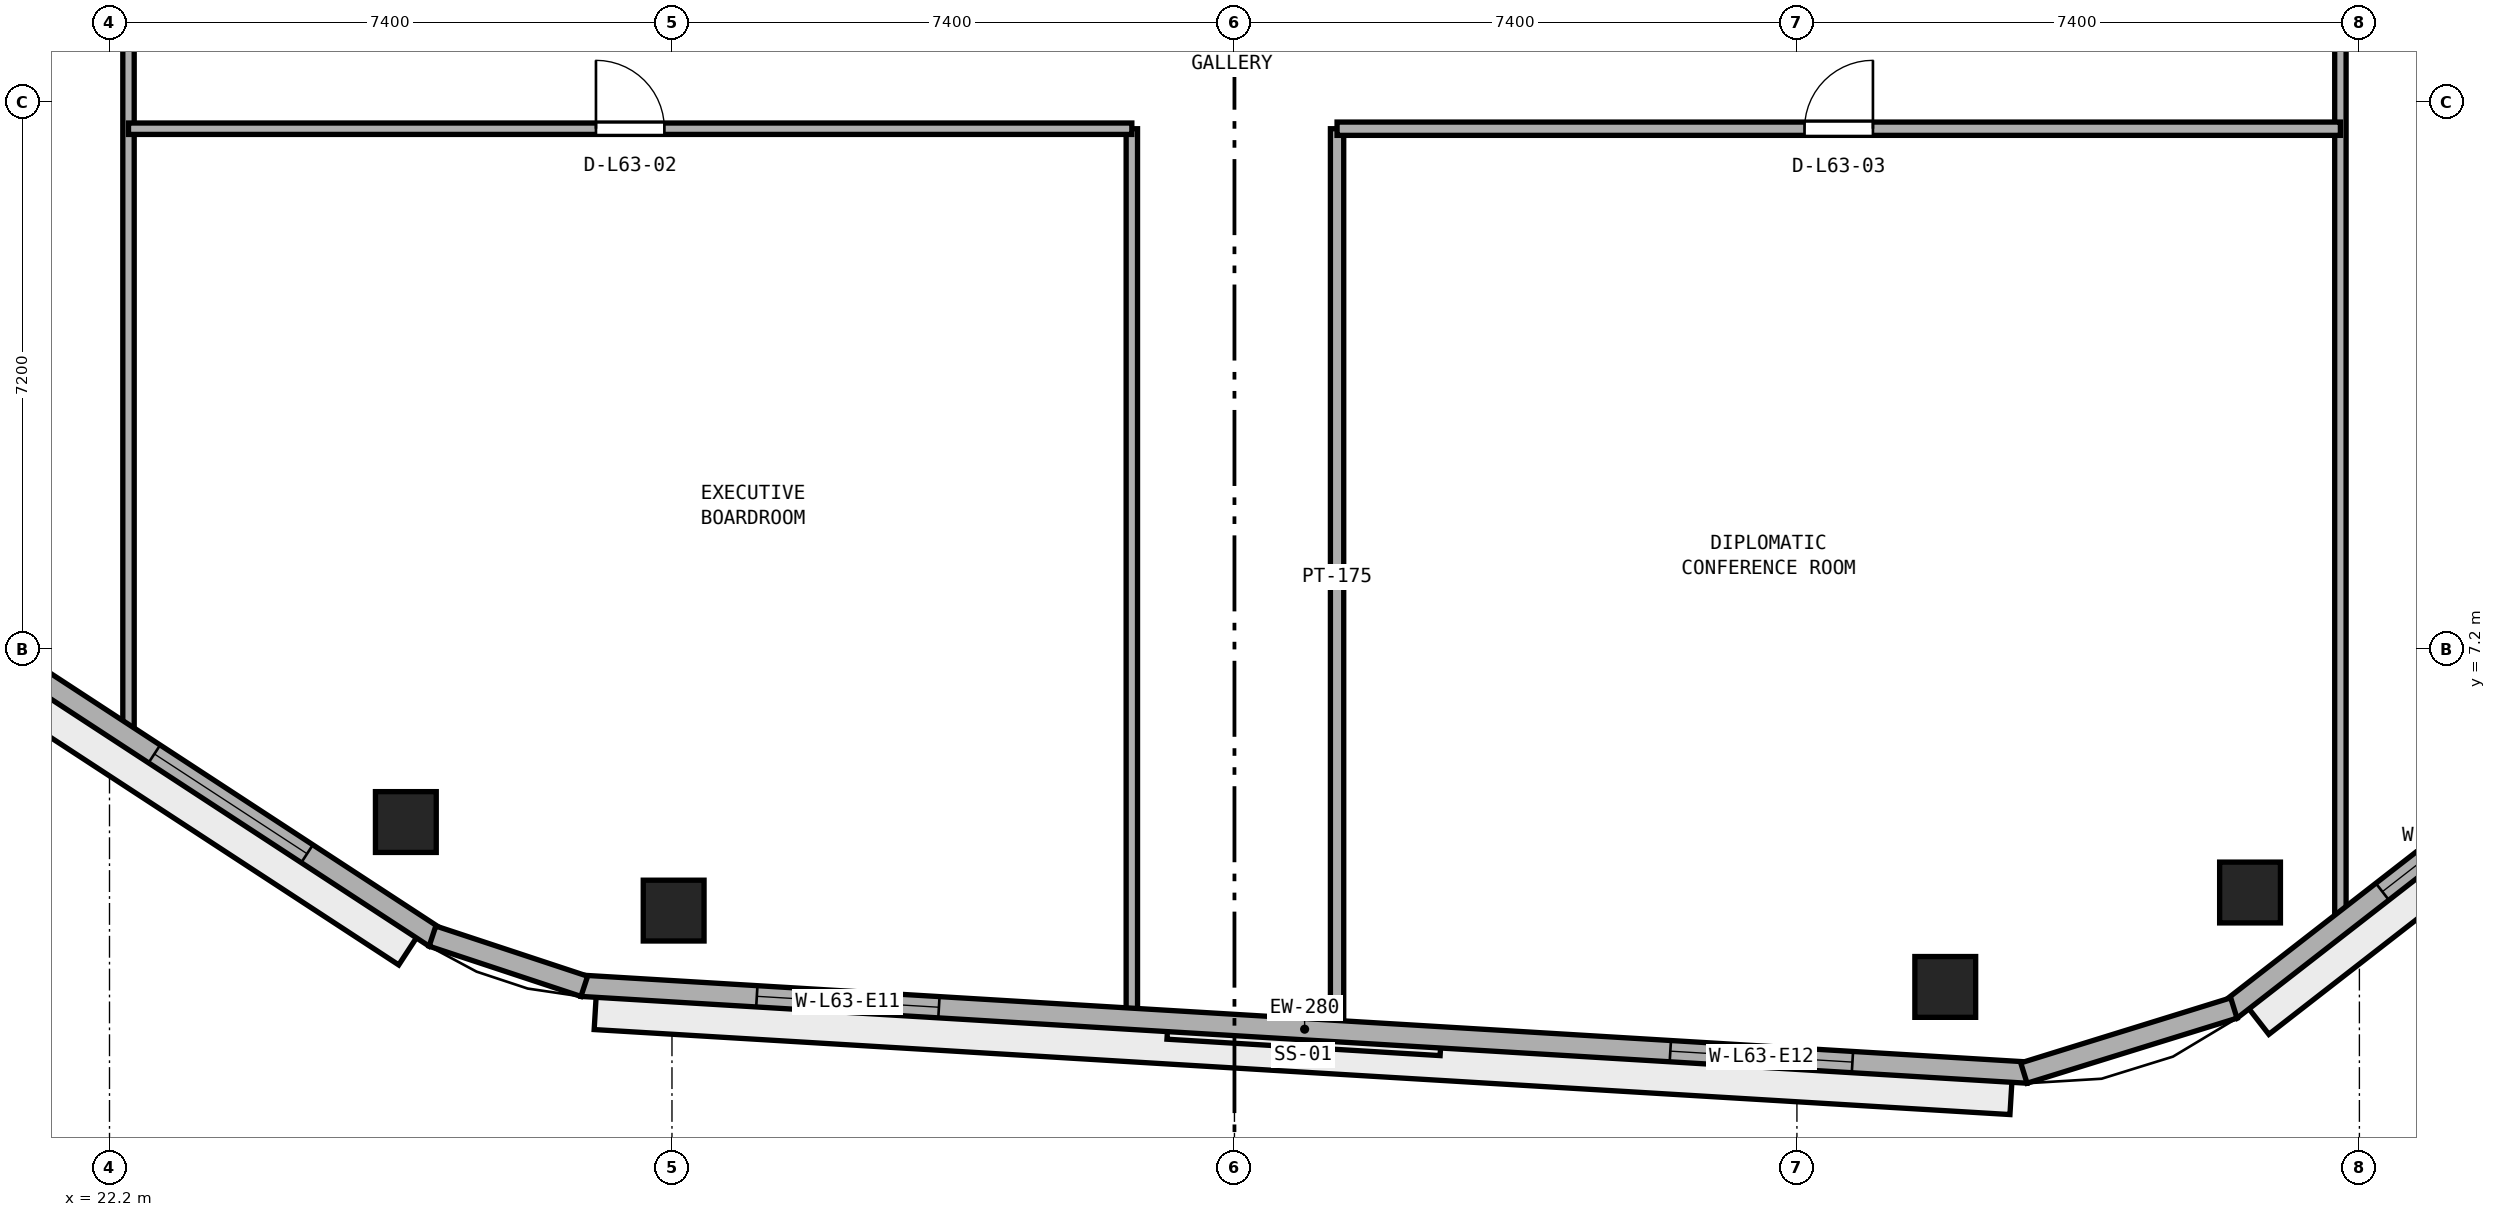
"""IFC4 building model, lengths in metres.
Left out: names, types, materials, properties, quantities, classifications, styles, units other than length and angle.
Written with IfcOpenShell. Run it as: python <this file> out.ifc"""

import sys

from ifc_helpers import new_model, si_unit, direction, frame, frame_2d, origin, origin_2d, place, context, subcontext, project, spatial, rectangle, extrude, element, fill, save


model = new_model("IFC4")
c1 = context("Model", 3, precision=1e-05, world=origin(), true_north=direction((0.0, 1.0)))
c2 = subcontext(c1, "Body", "Model", "MODEL_VIEW")
j1 = project(units=[si_unit("LENGTHUNIT", "METRE"), si_unit("PLANEANGLEUNIT", "RADIAN")], contexts=[c1])
p1 = place(None, origin())
s1 = spatial("IfcSite", under=j1, at=p1, CompositionType="ELEMENT")
p2 = place(p1, origin())
s2 = spatial("IfcBuilding", under=s1, at=p2, CompositionType="ELEMENT")
p3 = place(p2, frame((0.0, 0.0, 247.8)))
s3 = spatial("IfcBuildingStorey", under=s2, at=p3, CompositionType="ELEMENT", Elevation=247.8)
for number, where, z_axis, x_axis in (
    (1, (29.622, 3.764, 0.0), (0.0, 0.0, 1.0), (1.0, 0.0, 0.0)),
    (2, (46.352, 2.76, 0.0), (0.0, 0.0, 1.0), (1.0, 0.0, 0.0)),
    (3, (50.361, 4.002, 0.0), (0.0, 0.0, 1.0), (1.0, 0.0, 0.0)),
    (4, (26.099, 4.929, 0.0), (0.0, 0.0, 1.0), (1.0, 0.0, 0.0)),
):
    element("IfcColumn", number, at=place(p3, frame(where, z_axis=z_axis, x_axis=x_axis)), inside=s3, PredefinedType="COLUMN", context=c2, shape_type="SweptSolid", body=[
        extrude(rectangle(XDim=0.8, YDim=0.8, at=origin_2d()), origin(), (0.0, 0.0, 1.0), 3.8),
    ])
p4 = place(p3, frame((51.55, 3.546, 0.0), z_axis=(0.0, 0.0, 1.0), x_axis=(0.0, 1.0, 0.0)))
e5 = element("IfcWall", 5, at=p4, inside=s3, PredefinedType="PARTITIONING", context=c2, shape_type="SweptSolid", body=[
    extrude(rectangle(XDim=24.254, YDim=0.15, at=frame_2d((12.127, 0.0))), origin(), (0.0, 0.0, 1.0), 3.51),
])
p5 = place(p4, frame((16.759, 0.0, 0.0)))
e6 = element("IfcOpeningElement", 6, at=p5, cuts=e5, PredefinedType="OPENING", context=c2, shape_type="SweptSolid", body=[
    extrude(rectangle(XDim=1.0, YDim=2.12, at=frame_2d((0.5, 1.06))), frame((0.0, 0.085, 0.0), z_axis=(0.0, -1.0, 0.0), x_axis=(1.0, 0.0, 0.0)), (0.0, 0.0, 1.0), 0.17),
])
p6 = place(p3, frame((38.35, 2.243, 0.0), z_axis=(0.0, 0.0, 1.0), x_axis=(0.0, 1.0, 0.0)))
e7 = element("IfcWall", 7, at=p6, inside=s3, PredefinedType="PARTITIONING", context=c2, shape_type="SweptSolid", body=[
    extrude(rectangle(XDim=11.807, YDim=0.175, at=frame_2d((5.904, 0.0))), origin(), (0.0, 0.0, 1.0), 3.51),
])
p7 = place(p3, frame((35.65, 2.405, 0.0), z_axis=(0.0, 0.0, 1.0), x_axis=(0.0, 1.0, 0.0)))
e8 = element("IfcWall", 8, at=p7, inside=s3, PredefinedType="PARTITIONING", context=c2, shape_type="SweptSolid", body=[
    extrude(rectangle(XDim=11.645, YDim=0.15, at=frame_2d((5.823, 0.0))), origin(), (0.0, 0.0, 1.0), 3.51),
])
p8 = place(p3, frame((22.45, 6.02, 0.0), z_axis=(0.0, 0.0, 1.0), x_axis=(0.0, 1.0, 0.0)))
e9 = element("IfcWall", 9, at=p8, inside=s3, PredefinedType="PARTITIONING", context=c2, shape_type="SweptSolid", body=[
    extrude(rectangle(XDim=38.106, YDim=0.15, at=frame_2d((19.053, 0.0))), origin(), (0.0, 0.0, 1.0), 3.51),
])
p9 = place(p8, frame((11.005, 0.0, 0.0)))
e10 = element("IfcOpeningElement", 10, at=p9, cuts=e9, PredefinedType="OPENING", context=c2, shape_type="SweptSolid", body=[
    extrude(rectangle(XDim=0.9, YDim=2.1, at=frame_2d((0.45, 1.05))), frame((0.0, 0.085, 0.0), z_axis=(0.0, -1.0, 0.0), x_axis=(1.0, 0.0, 0.0)), (0.0, 0.0, 1.0), 0.17),
])
p10 = place(p8, frame((22.155, 0.0, 0.0)))
e11 = element("IfcOpeningElement", 11, at=p10, cuts=e9, PredefinedType="OPENING", context=c2, shape_type="SweptSolid", body=[
    extrude(rectangle(XDim=0.9, YDim=2.1, at=frame_2d((0.45, 1.05))), frame((0.0, 0.085, 0.0), z_axis=(0.0, -1.0, 0.0), x_axis=(1.0, 0.0, 0.0)), (0.0, 0.0, 1.0), 0.17),
])
p11 = place(p3, frame((22.45, 14.05, 0.0), z_axis=(0.0, 0.0, 1.0), x_axis=(1.0, 0.0, 0.0)))
e12 = element("IfcWall", 12, at=p11, inside=s3, PredefinedType="PARTITIONING", context=c2, shape_type="SweptSolid", body=[
    extrude(rectangle(XDim=13.2, YDim=0.15, at=frame_2d((6.6, 0.0))), origin(), (0.0, 0.0, 1.0), 3.51),
])
p12 = place(p11, frame((6.15, 0.0, 0.0)))
e13 = element("IfcOpeningElement", 13, at=p12, cuts=e12, PredefinedType="OPENING", context=c2, shape_type="SweptSolid", body=[
    extrude(rectangle(XDim=0.9, YDim=2.1, at=frame_2d((0.45, 1.05))), frame((0.0, 0.085, 0.0), z_axis=(0.0, -1.0, 0.0), x_axis=(1.0, 0.0, 0.0)), (0.0, 0.0, 1.0), 0.17),
])
p13 = place(p3, frame((38.35, 14.05, 0.0), z_axis=(0.0, 0.0, 1.0), x_axis=(1.0, 0.0, 0.0)))
e14 = element("IfcWall", 14, at=p13, inside=s3, PredefinedType="PARTITIONING", context=c2, shape_type="SweptSolid", body=[
    extrude(rectangle(XDim=13.2, YDim=0.175, at=frame_2d((6.6, 0.0))), origin(), (0.0, 0.0, 1.0), 3.51),
])
p14 = place(p13, frame((6.15, 0.0, 0.0)))
e15 = element("IfcOpeningElement", 15, at=p14, cuts=e14, PredefinedType="OPENING", context=c2, shape_type="SweptSolid", body=[
    extrude(rectangle(XDim=0.9, YDim=2.1, at=frame_2d((0.45, 1.05))), frame((0.0, 0.097, 0.0), z_axis=(0.0, -1.0, 0.0), x_axis=(1.0, 0.0, 0.0)), (0.0, 0.0, 1.0), 0.195),
])
p15 = place(p3, frame((28.411, 2.774, 0.0), z_axis=(0.0, 0.0, 1.0), x_axis=(0.998203068368, -0.059921901676, 0.0)))
e16 = element("IfcWall", 16, at=p15, inside=s3, PredefinedType="STANDARD", context=c2, shape_type="SweptSolid", body=[
    extrude(rectangle(XDim=19.06, YDim=0.28, at=frame_2d((9.53, 0.0))), origin(), (0.0, 0.0, 1.0), 3.51),
])
p16 = place(p15, frame((2.31, 0.0, 0.9)))
e17 = element("IfcOpeningElement", 17, at=p16, cuts=e16, PredefinedType="OPENING", context=c2, shape_type="SweptSolid", body=[
    extrude(rectangle(XDim=2.4, YDim=1.75, at=frame_2d((1.2, 0.875))), frame((0.0, 0.15, 0.0), z_axis=(0.0, -1.0, 0.0), x_axis=(1.0, 0.0, 0.0)), (0.0, 0.0, 1.0), 0.3),
])
p17 = place(p15, frame((14.35, 0.0, 0.9)))
e18 = element("IfcOpeningElement", 18, at=p17, cuts=e16, PredefinedType="OPENING", context=c2, shape_type="SweptSolid", body=[
    extrude(rectangle(XDim=2.4, YDim=1.75, at=frame_2d((1.2, 0.875))), frame((0.0, 0.15, 0.0), z_axis=(0.0, -1.0, 0.0), x_axis=(1.0, 0.0, 0.0)), (0.0, 0.0, 1.0), 0.3),
])
p18 = place(p3, frame((50.104, 2.459, 0.0), z_axis=(0.0, 0.0, 1.0), x_axis=(0.789464857485, 0.613795763097, 0.0)))
e19 = element("IfcWall", 19, at=p18, inside=s3, PredefinedType="STANDARD", context=c2, shape_type="SweptSolid", body=[
    extrude(rectangle(XDim=17.387, YDim=0.28, at=frame_2d((8.694, 0.0))), origin(), (0.0, 0.0, 1.0), 3.51),
])
p19 = place(p18, frame((2.531, 0.0, 0.9)))
e20 = element("IfcOpeningElement", 20, at=p19, cuts=e19, PredefinedType="OPENING", context=c2, shape_type="SweptSolid", body=[
    extrude(rectangle(XDim=2.4, YDim=1.75, at=frame_2d((1.2, 0.875))), frame((0.0, 0.15, 0.0), z_axis=(0.0, -1.0, 0.0), x_axis=(1.0, 0.0, 0.0)), (0.0, 0.0, 1.0), 0.3),
])
p20 = place(p18, frame((7.494, 0.0, 0.9)))
e21 = element("IfcOpeningElement", 21, at=p20, cuts=e19, PredefinedType="OPENING", context=c2, shape_type="SweptSolid", body=[
    extrude(rectangle(XDim=2.4, YDim=1.75, at=frame_2d((1.2, 0.875))), frame((0.0, 0.15, 0.0), z_axis=(0.0, -1.0, 0.0), x_axis=(1.0, 0.0, 0.0)), (0.0, 0.0, 1.0), 0.3),
])
p21 = place(p18, frame((12.956, 0.0, 0.9)))
e22 = element("IfcOpeningElement", 22, at=p21, cuts=e19, PredefinedType="OPENING", context=c2, shape_type="SweptSolid", body=[
    extrude(rectangle(XDim=2.4, YDim=1.75, at=frame_2d((1.2, 0.875))), frame((0.0, 0.15, 0.0), z_axis=(0.0, -1.0, 0.0), x_axis=(1.0, 0.0, 0.0)), (0.0, 0.0, 1.0), 0.3),
])
p22 = place(p3, frame((12.034, 12.854, 0.0), z_axis=(0.0, 0.0, 1.0), x_axis=(0.837118352984, -0.547021812269, 0.0)))
e23 = element("IfcWall", 23, at=p22, inside=s3, PredefinedType="STANDARD", context=c2, shape_type="SweptSolid", body=[
    extrude(rectangle(XDim=17.259, YDim=0.28, at=frame_2d((8.63, 0.0))), origin(), (0.0, 0.0, 1.0), 3.51),
])
p23 = place(p22, frame((2.01, 0.0, 0.9)))
e24 = element("IfcOpeningElement", 24, at=p23, cuts=e23, PredefinedType="OPENING", context=c2, shape_type="SweptSolid", body=[
    extrude(rectangle(XDim=2.4, YDim=1.75, at=frame_2d((1.2, 0.875))), frame((0.0, 0.15, 0.0), z_axis=(0.0, -1.0, 0.0), x_axis=(1.0, 0.0, 0.0)), (0.0, 0.0, 1.0), 0.3),
])
p24 = place(p22, frame((7.43, 0.0, 0.9)))
e25 = element("IfcOpeningElement", 25, at=p24, cuts=e23, PredefinedType="OPENING", context=c2, shape_type="SweptSolid", body=[
    extrude(rectangle(XDim=2.4, YDim=1.75, at=frame_2d((1.2, 0.875))), frame((0.0, 0.15, 0.0), z_axis=(0.0, -1.0, 0.0), x_axis=(1.0, 0.0, 0.0)), (0.0, 0.0, 1.0), 0.3),
])
p25 = place(p22, frame((12.849, 0.0, 0.9)))
e26 = element("IfcOpeningElement", 26, at=p25, cuts=e23, PredefinedType="OPENING", context=c2, shape_type="SweptSolid", body=[
    extrude(rectangle(XDim=2.4, YDim=1.75, at=frame_2d((1.2, 0.875))), frame((0.0, 0.15, 0.0), z_axis=(0.0, -1.0, 0.0), x_axis=(1.0, 0.0, 0.0)), (0.0, 0.0, 1.0), 0.3),
])
p26 = place(p3, frame((47.386, 1.626, 0.0), z_axis=(0.0, 0.0, 1.0), x_axis=(0.955189316149, 0.29599555793, 0.0)))
e27 = element("IfcWall", 27, at=p26, inside=s3, PredefinedType="STANDARD", context=c2, shape_type="SweptSolid", body=[
    extrude(rectangle(XDim=2.892, YDim=0.28, at=frame_2d((1.446, 0.0))), origin(), (0.0, 0.0, 1.0), 3.51),
])
p27 = place(p3, frame((26.449, 3.428, 0.0), z_axis=(0.0, 0.0, 1.0), x_axis=(0.949435039229, -0.313963542923, 0.0)))
e28 = element("IfcWall", 28, at=p27, inside=s3, PredefinedType="STANDARD", context=c2, shape_type="SweptSolid", body=[
    extrude(rectangle(XDim=2.104, YDim=0.28, at=frame_2d((1.052, 0.0))), origin(), (0.0, 0.0, 1.0), 3.51),
])
p28 = place(p12, origin())
e29 = element("IfcDoor", 29, at=p28, inside=s3, OperationType="SINGLE_SWING_LEFT", PredefinedType="DOOR", context=c2, shape_type="SweptSolid", body=[
    extrude(rectangle(XDim=0.9, YDim=2.1, at=frame_2d((0.45, 1.05))), frame((0.0, 0.025, 0.0), z_axis=(0.0, -1.0, 0.0), x_axis=(1.0, 0.0, 0.0)), (0.0, 0.0, 1.0), 0.05),
])
fill(e13, e29)
p29 = place(p14, origin())
e30 = element("IfcDoor", 30, at=p29, inside=s3, OperationType="SINGLE_SWING_RIGHT", PredefinedType="DOOR", context=c2, shape_type="SweptSolid", body=[
    extrude(rectangle(XDim=0.9, YDim=2.1, at=frame_2d((0.45, 1.05))), frame((0.0, 0.025, 0.0), z_axis=(0.0, -1.0, 0.0), x_axis=(1.0, 0.0, 0.0)), (0.0, 0.0, 1.0), 0.05),
])
fill(e15, e30)
p30 = place(p16, origin())
e31 = element("IfcWindow", 31, at=p30, inside=s3, PartitioningType="SINGLE_PANEL", PredefinedType="WINDOW", context=c2, shape_type="SweptSolid", body=[
    extrude(rectangle(XDim=2.4, YDim=1.75, at=frame_2d((1.2, 0.875))), frame((0.0, 0.03, 0.0), z_axis=(0.0, -1.0, 0.0), x_axis=(1.0, 0.0, 0.0)), (0.0, 0.0, 1.0), 0.06),
])
fill(e17, e31)
p31 = place(p17, origin())
e32 = element("IfcWindow", 32, at=p31, inside=s3, PartitioningType="SINGLE_PANEL", PredefinedType="WINDOW", context=c2, shape_type="SweptSolid", body=[
    extrude(rectangle(XDim=2.4, YDim=1.75, at=frame_2d((1.2, 0.875))), frame((0.0, 0.03, 0.0), z_axis=(0.0, -1.0, 0.0), x_axis=(1.0, 0.0, 0.0)), (0.0, 0.0, 1.0), 0.06),
])
fill(e18, e32)
p32 = place(p19, origin())
e33 = element("IfcWindow", 33, at=p32, inside=s3, PartitioningType="SINGLE_PANEL", PredefinedType="WINDOW", context=c2, shape_type="SweptSolid", body=[
    extrude(rectangle(XDim=2.4, YDim=1.75, at=frame_2d((1.2, 0.875))), frame((0.0, 0.03, 0.0), z_axis=(0.0, -1.0, 0.0), x_axis=(1.0, 0.0, 0.0)), (0.0, 0.0, 1.0), 0.06),
])
fill(e20, e33)
p33 = place(p25, origin())
e34 = element("IfcWindow", 34, at=p33, inside=s3, PartitioningType="SINGLE_PANEL", PredefinedType="WINDOW", context=c2, shape_type="SweptSolid", body=[
    extrude(rectangle(XDim=2.4, YDim=1.75, at=frame_2d((1.2, 0.875))), frame((0.0, 0.03, 0.0), z_axis=(0.0, -1.0, 0.0), x_axis=(1.0, 0.0, 0.0)), (0.0, 0.0, 1.0), 0.06),
])
fill(e26, e34)
save(model, sys.argv[1])
